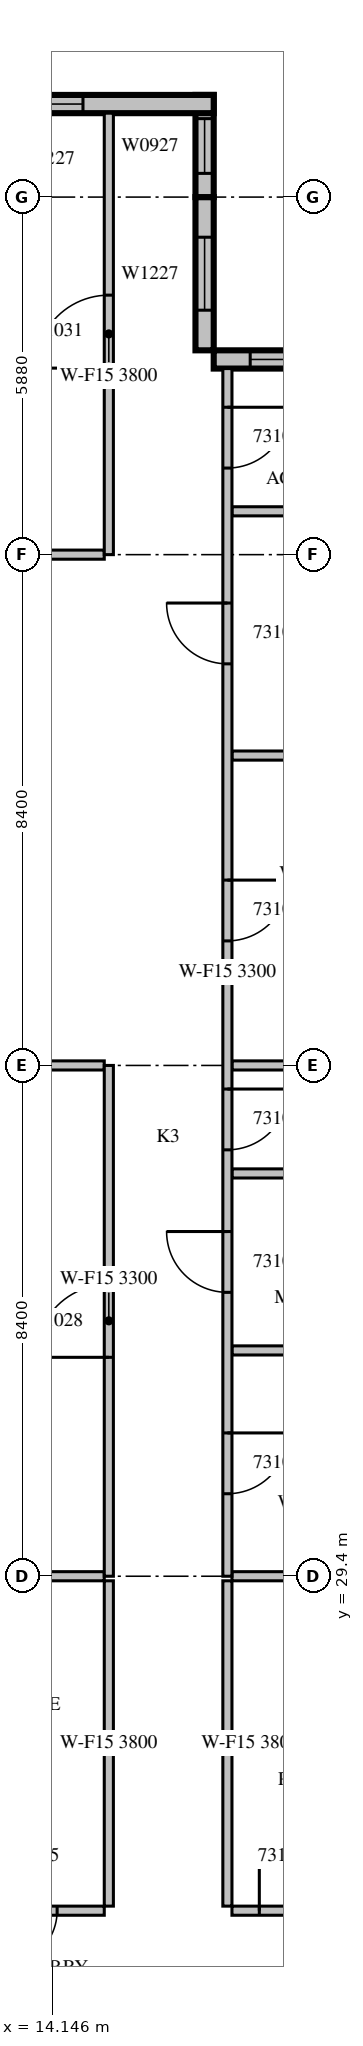
"""IFC4 building model, lengths in metres.
Left out: names, types, materials, properties, quantities, classifications, styles, units other than length and angle.
Written with IfcOpenShell. Run it as: python <this file> out.ifc"""

import sys

from ifc_helpers import new_model, si_unit, direction, frame, frame_2d, origin, place, context, subcontext, project, spatial, rectangle, extrude, source, transform, mapped, element, fill, save


model = new_model("IFC4")
c1 = context("Model", 3, precision=1e-05, world=origin(), true_north=direction((0.0, 1.0)))
c2 = subcontext(c1, "Body", "Model", "MODEL_VIEW")
j1 = project(units=[si_unit("LENGTHUNIT", "METRE"), si_unit("PLANEANGLEUNIT", "RADIAN")], contexts=[c1])
p1 = place(None, origin())
s1 = spatial("IfcSite", under=j1, at=p1, CompositionType="ELEMENT")
p2 = place(p1, origin())
s2 = spatial("IfcBuilding", under=s1, at=p2, CompositionType="ELEMENT")
p3 = place(p2, frame((0.0, 0.0, 141.3)))
s3 = spatial("IfcBuildingStorey", under=s2, at=p3, CompositionType="ELEMENT", Elevation=141.3)
m1 = source(origin(), c2, "Body", "SweptSolid", [
    extrude(rectangle(XDim=4.2, YDim=0.3, at=frame_2d((2.1, 0.0))), origin(), (0.0, 0.0, 1.0), 3.8),
])
p4 = place(p3, frame((21.0, 49.41, 0.0), z_axis=(0.0, 0.0, 1.0), x_axis=(-1.0, 0.0, 0.0)))
e1 = element("IfcWall", 1, at=p4, inside=s3, PredefinedType="STANDARD", context=c2, shape_type="MappedRepresentation", body=[
    mapped(m1, transform((0.0, 0.0, 0.0), scale=1.0)),
])
m2 = source(origin(), c2, "Body", "SweptSolid", [
    extrude(rectangle(XDim=3.0, YDim=2.7, at=frame_2d((1.5, 1.35))), frame((0.0, 0.16, 0.0), z_axis=(0.0, -1.0, 0.0), x_axis=(1.0, 0.0, 0.0)), (0.0, 0.0, 1.0), 0.32),
])
p5 = place(p4, frame((0.6, 0.0, 0.6)))
e2 = element("IfcOpeningElement", 2, at=p5, cuts=e1, PredefinedType="OPENING", context=c2, shape_type="MappedRepresentation", body=[
    mapped(m2, transform((0.0, 0.0, 0.0), scale=1.0)),
])
m3 = source(origin(), c2, "Body", "SweptSolid", [
    extrude(rectangle(XDim=2.52, YDim=0.3, at=frame_2d((1.26, 0.0))), origin(), (0.0, 0.0, 1.0), 3.8),
])
p6 = place(p3, frame((16.65, 49.56, 0.0), z_axis=(0.0, 0.0, 1.0), x_axis=(0.0, 1.0, 0.0)))
e3 = element("IfcWall", 3, at=p6, inside=s3, PredefinedType="STANDARD", context=c2, shape_type="MappedRepresentation", body=[
    mapped(m3, transform((0.0, 0.0, 0.0), scale=1.0)),
])
m4 = source(origin(), c2, "Body", "SweptSolid", [
    extrude(rectangle(XDim=1.2, YDim=2.7, at=frame_2d((0.6, 1.35))), frame((0.0, 0.16, 0.0), z_axis=(0.0, -1.0, 0.0), x_axis=(1.0, 0.0, 0.0)), (0.0, 0.0, 1.0), 0.32),
])
p7 = place(p6, frame((0.66, 0.0, 0.6)))
e4 = element("IfcOpeningElement", 4, at=p7, cuts=e3, PredefinedType="OPENING", context=c2, shape_type="MappedRepresentation", body=[
    mapped(m4, transform((0.0, 0.0, 0.0), scale=1.0)),
])
m5 = source(origin(), c2, "Body", "SweptSolid", [
    extrude(rectangle(XDim=1.68, YDim=0.3, at=frame_2d((0.84, 0.0))), origin(), (0.0, 0.0, 1.0), 3.8),
])
p8 = place(p3, frame((16.65, 52.08, 0.0), z_axis=(0.0, 0.0, 1.0), x_axis=(0.0, 1.0, 0.0)))
e5 = element("IfcWall", 5, at=p8, inside=s3, PredefinedType="STANDARD", context=c2, shape_type="MappedRepresentation", body=[
    mapped(m5, transform((0.0, 0.0, 0.0), scale=1.0)),
])
m6 = source(origin(), c2, "Body", "SweptSolid", [
    extrude(rectangle(XDim=0.9, YDim=2.7, at=frame_2d((0.45, 1.35))), frame((0.0, 0.16, 0.0), z_axis=(0.0, -1.0, 0.0), x_axis=(1.0, 0.0, 0.0)), (0.0, 0.0, 1.0), 0.32),
])
p9 = place(p8, frame((0.39, 0.0, 0.6)))
e6 = element("IfcOpeningElement", 6, at=p9, cuts=e5, PredefinedType="OPENING", context=c2, shape_type="MappedRepresentation", body=[
    mapped(m6, transform((0.0, 0.0, 0.0), scale=1.0)),
])
m7 = source(origin(), c2, "Body", "SweptSolid", [
    extrude(rectangle(XDim=10.5, YDim=0.3, at=frame_2d((5.25, 0.0))), origin(), (0.0, 0.0, 1.0), 3.8),
])
p10 = place(p3, frame((16.8, 53.61, 0.0), z_axis=(0.0, 0.0, 1.0), x_axis=(-1.0, 0.0, 0.0)))
e7 = element("IfcWall", 7, at=p10, inside=s3, PredefinedType="STANDARD", context=c2, shape_type="MappedRepresentation", body=[
    mapped(m7, transform((0.0, 0.0, 0.0), scale=1.0)),
])
p11 = place(p10, frame((2.15, 0.0, 0.6)))
e8 = element("IfcOpeningElement", 8, at=p11, cuts=e7, PredefinedType="OPENING", context=c2, shape_type="MappedRepresentation", body=[
    mapped(m4, transform((0.0, 0.0, 0.0), scale=1.0)),
])
m8 = source(origin(), c2, "Body", "SweptSolid", [
    extrude(rectangle(XDim=1.8, YDim=2.7, at=frame_2d((0.9, 1.35))), frame((0.0, 0.16, 0.0), z_axis=(0.0, -1.0, 0.0), x_axis=(1.0, 0.0, 0.0)), (0.0, 0.0, 1.0), 0.32),
])
p12 = place(p10, frame((8.025, 0.0, 0.6)))
e9 = element("IfcOpeningElement", 9, at=p12, cuts=e7, PredefinedType="OPENING", context=c2, shape_type="MappedRepresentation", body=[
    mapped(m8, transform((0.0, 0.0, 0.0), scale=1.0)),
])
m9 = source(origin(), c2, "Body", "SweptSolid", [
    extrude(rectangle(XDim=8.495, YDim=0.15, at=frame_2d((4.247, 0.0))), origin(), (0.0, 0.0, 1.0), 3.8),
])
p13 = place(p3, frame((6.505, 23.9, 0.0), z_axis=(0.0, 0.0, 1.0), x_axis=(1.0, 0.0, 0.0)))
e10 = element("IfcWall", 10, at=p13, inside=s3, PredefinedType="PARTITIONING", context=c2, shape_type="MappedRepresentation", body=[
    mapped(m9, transform((0.0, 0.0, 0.0), scale=1.0)),
])
m10 = source(origin(), c2, "Body", "SweptSolid", [
    extrude(rectangle(XDim=0.9, YDim=2.1, at=frame_2d((0.45, 1.05))), frame((0.0, 0.085, 0.0), z_axis=(0.0, -1.0, 0.0), x_axis=(1.0, 0.0, 0.0)), (0.0, 0.0, 1.0), 0.17),
])
p14 = place(p13, frame((1.745, 0.0, 0.0)))
e11 = element("IfcOpeningElement", 11, at=p14, cuts=e10, PredefinedType="OPENING", context=c2, shape_type="MappedRepresentation", body=[
    mapped(m10, transform((0.0, 0.0, 0.0), scale=1.0)),
])
p15 = place(p13, frame((6.82, 0.0, 0.0)))
e12 = element("IfcOpeningElement", 12, at=p15, cuts=e10, PredefinedType="OPENING", context=c2, shape_type="MappedRepresentation", body=[
    mapped(m10, transform((0.0, 0.0, 0.0), scale=1.0)),
])
m11 = source(origin(), c2, "Body", "SweptSolid", [
    extrude(rectangle(XDim=3.6, YDim=0.15, at=frame_2d((1.8, 0.0))), origin(), (0.0, 0.0, 1.0), 3.8),
])
p16 = place(p3, frame((17.1, 23.9, 0.0), z_axis=(0.0, 0.0, 1.0), x_axis=(1.0, 0.0, 0.0)))
e13 = element("IfcWall", 13, at=p16, inside=s3, PredefinedType="PARTITIONING", context=c2, shape_type="MappedRepresentation", body=[
    mapped(m11, transform((0.0, 0.0, 0.0), scale=1.0)),
])
p17 = place(p16, frame((0.45, 0.0, 0.0)))
e14 = element("IfcOpeningElement", 14, at=p17, cuts=e13, PredefinedType="OPENING", context=c2, shape_type="MappedRepresentation", body=[
    mapped(m10, transform((0.0, 0.0, 0.0), scale=1.0)),
])
m12 = source(origin(), c2, "Body", "SweptSolid", [
    extrude(rectangle(XDim=5.35, YDim=0.15, at=frame_2d((2.675, 0.0))), origin(), (0.0, 0.0, 1.0), 3.8),
])
for number, where, z_axis, x_axis in (
    (15, (15.075, 23.975, 0.0), (0.0, 0.0, 1.0), (0.0, 1.0, 0.0)),
    (16, (17.025, 29.325, 0.0), (0.0, 0.0, 1.0), (0.0, -1.0, 0.0)),
):
    element("IfcWall", number, at=place(p3, frame(where, z_axis=z_axis, x_axis=x_axis)), inside=s3, PredefinedType="PARTITIONING", context=c2, shape_type="MappedRepresentation", body=[
        mapped(m12, transform((0.0, 0.0, 0.0), scale=1.0)),
    ])
m13 = source(origin(), c2, "Body", "SweptSolid", [
    extrude(rectangle(XDim=3.976, YDim=0.15, at=frame_2d((1.988, 0.0))), origin(), (0.0, 0.0, 1.0), 3.8),
])
p18 = place(p3, frame((15.0, 29.4, 0.0), z_axis=(0.0, 0.0, 1.0), x_axis=(-1.0, 0.0, 0.0)))
e17 = element("IfcWall", 17, at=p18, inside=s3, PredefinedType="PARTITIONING", context=c2, shape_type="MappedRepresentation", body=[
    mapped(m13, transform((0.0, 0.0, 0.0), scale=1.0)),
])
m14 = source(origin(), c2, "Body", "SweptSolid", [
    extrude(rectangle(XDim=2.851, YDim=0.15, at=frame_2d((1.425, 0.0))), origin(), (0.0, 0.0, 1.0), 3.8),
])
p19 = place(p3, frame((19.951, 29.4, 0.0), z_axis=(0.0, 0.0, 1.0), x_axis=(-1.0, 0.0, 0.0)))
e18 = element("IfcWall", 18, at=p19, inside=s3, PredefinedType="PARTITIONING", context=c2, shape_type="MappedRepresentation", body=[
    mapped(m14, transform((0.0, 0.0, 0.0), scale=1.0)),
])
m15 = source(origin(), c2, "Body", "SweptSolid", [
    extrude(rectangle(XDim=3.825, YDim=0.15, at=frame_2d((1.913, 0.0))), origin(), (0.0, 0.0, 1.0), 3.8),
])
for number, where, z_axis, x_axis in (
    (19, (15.0, 37.8, 0.0), (0.0, 0.0, 1.0), (-1.0, 0.0, 0.0)),
    (20, (15.0, 46.2, 0.0), (0.0, 0.0, 1.0), (-1.0, 0.0, 0.0)),
):
    element("IfcWall", number, at=place(p3, frame(where, z_axis=z_axis, x_axis=x_axis)), inside=s3, PredefinedType="PARTITIONING", context=c2, shape_type="MappedRepresentation", body=[
        mapped(m15, transform((0.0, 0.0, 0.0), scale=1.0)),
    ])
m16 = source(origin(), c2, "Body", "SweptSolid", [
    extrude(rectangle(XDim=3.6, YDim=0.15, at=frame_2d((1.8, 0.0))), origin(), (0.0, 0.0, 1.0), 2.8),
])
for number, where, z_axis, x_axis in (
    (21, (17.1, 33.113, 0.0), (0.0, 0.0, 1.0), (1.0, 0.0, 0.0)),
    (22, (17.1, 36.024, 0.0), (0.0, 0.0, 1.0), (1.0, 0.0, 0.0)),
):
    element("IfcWall", number, at=place(p3, frame(where, z_axis=z_axis, x_axis=x_axis)), inside=s3, PredefinedType="PARTITIONING", context=c2, shape_type="MappedRepresentation", body=[
        mapped(m16, transform((0.0, 0.0, 0.0), scale=1.0)),
    ])
for number, where, z_axis, x_axis in (
    (23, (17.1, 42.896, 0.0), (0.0, 0.0, 1.0), (1.0, 0.0, 0.0)),
    (24, (17.1, 46.913, 0.0), (0.0, 0.0, 1.0), (1.0, 0.0, 0.0)),
):
    element("IfcWall", number, at=place(p3, frame(where, z_axis=z_axis, x_axis=x_axis)), inside=s3, PredefinedType="PARTITIONING", context=c2, shape_type="MappedRepresentation", body=[
        mapped(m11, transform((0.0, 0.0, 0.0), scale=1.0)),
    ])
p20 = place(p3, frame((19.951, 37.8, 0.0), z_axis=(0.0, 0.0, 1.0), x_axis=(-1.0, 0.0, 0.0)))
e25 = element("IfcWall", 25, at=p20, inside=s3, PredefinedType="PARTITIONING", context=c2, shape_type="MappedRepresentation", body=[
    mapped(m14, transform((0.0, 0.0, 0.0), scale=1.0)),
])
m17 = source(origin(), c2, "Body", "SweptSolid", [
    extrude(rectangle(XDim=8.4, YDim=0.15, at=frame_2d((4.2, 0.0))), origin(), (0.0, 0.0, 1.0), 3.3),
])
p21 = place(p3, frame((15.075, 29.4, 0.0), z_axis=(0.0, 0.0, 1.0), x_axis=(0.0, 1.0, 0.0)))
e26 = element("IfcWall", 26, at=p21, inside=s3, PredefinedType="PARTITIONING", context=c2, shape_type="MappedRepresentation", body=[
    mapped(m17, transform((0.0, 0.0, 0.0), scale=1.0)),
])
m18 = source(origin(), c2, "Body", "SweptSolid", [
    extrude(rectangle(XDim=1.2, YDim=2.1, at=frame_2d((0.6, 1.05))), frame((0.0, 0.085, 0.0), z_axis=(0.0, -1.0, 0.0), x_axis=(1.0, 0.0, 0.0)), (0.0, 0.0, 1.0), 0.17),
])
p22 = place(p21, frame((3.6, 0.0, 0.0)))
e27 = element("IfcOpeningElement", 27, at=p22, cuts=e26, PredefinedType="OPENING", context=c2, shape_type="MappedRepresentation", body=[
    mapped(m18, transform((0.0, 0.0, 0.0), scale=1.0)),
])
m19 = source(origin(), c2, "Body", "SweptSolid", [
    extrude(rectangle(XDim=7.26, YDim=0.15, at=frame_2d((3.63, 0.0))), origin(), (0.0, 0.0, 1.0), 3.8),
])
p23 = place(p3, frame((15.075, 46.2, 0.0), z_axis=(0.0, 0.0, 1.0), x_axis=(0.0, 1.0, 0.0)))
e28 = element("IfcWall", 28, at=p23, inside=s3, PredefinedType="PARTITIONING", context=c2, shape_type="MappedRepresentation", body=[
    mapped(m19, transform((0.0, 0.0, 0.0), scale=1.0)),
])
p24 = place(p23, frame((3.067, 0.0, 0.0)))
e29 = element("IfcOpeningElement", 29, at=p24, cuts=e28, PredefinedType="OPENING", context=c2, shape_type="MappedRepresentation", body=[
    mapped(m18, transform((0.0, 0.0, 0.0), scale=1.0)),
])
m20 = source(origin(), c2, "Body", "SweptSolid", [
    extrude(rectangle(XDim=19.86, YDim=0.15, at=frame_2d((9.93, 0.0))), origin(), (0.0, 0.0, 1.0), 3.3),
])
p25 = place(p3, frame((17.025, 49.26, 0.0), z_axis=(0.0, 0.0, 1.0), x_axis=(0.0, -1.0, 0.0)))
e30 = element("IfcWall", 30, at=p25, inside=s3, PredefinedType="PARTITIONING", context=c2, shape_type="MappedRepresentation", body=[
    mapped(m20, transform((0.0, 0.0, 0.0), scale=1.0)),
])
m21 = source(origin(), c2, "Body", "SweptSolid", [
    extrude(rectangle(XDim=1.0, YDim=2.1, at=frame_2d((0.5, 1.05))), frame((0.0, 0.085, 0.0), z_axis=(0.0, -1.0, 0.0), x_axis=(1.0, 0.0, 0.0)), (0.0, 0.0, 1.0), 0.17),
])
p26 = place(p25, frame((17.503, 0.0, 0.0)))
e31 = element("IfcOpeningElement", 31, at=p26, cuts=e30, PredefinedType="OPENING", context=c2, shape_type="MappedRepresentation", body=[
    mapped(m21, transform((0.0, 0.0, 0.0), scale=1.0)),
])
p27 = place(p25, frame((14.191, 0.0, 0.0)))
e32 = element("IfcOpeningElement", 32, at=p27, cuts=e30, PredefinedType="OPENING", context=c2, shape_type="MappedRepresentation", body=[
    mapped(m21, transform((0.0, 0.0, 0.0), scale=1.0)),
])
p28 = place(p25, frame((11.848, 0.0, 0.0)))
e33 = element("IfcOpeningElement", 33, at=p28, cuts=e30, PredefinedType="OPENING", context=c2, shape_type="MappedRepresentation", body=[
    mapped(m21, transform((0.0, 0.0, 0.0), scale=1.0)),
])
p29 = place(p25, frame((8.412, 0.0, 0.0)))
e34 = element("IfcOpeningElement", 34, at=p29, cuts=e30, PredefinedType="OPENING", context=c2, shape_type="MappedRepresentation", body=[
    mapped(m21, transform((0.0, 0.0, 0.0), scale=1.0)),
])
p30 = place(p25, frame((3.856, 0.0, 0.0)))
e35 = element("IfcOpeningElement", 35, at=p30, cuts=e30, PredefinedType="OPENING", context=c2, shape_type="MappedRepresentation", body=[
    mapped(m21, transform((0.0, 0.0, 0.0), scale=1.0)),
])
p31 = place(p25, frame((0.636, 0.0, 0.0)))
e36 = element("IfcOpeningElement", 36, at=p31, cuts=e30, PredefinedType="OPENING", context=c2, shape_type="MappedRepresentation", body=[
    mapped(m21, transform((0.0, 0.0, 0.0), scale=1.0)),
])
m22 = source(origin(), c2, "Body", "SweptSolid", [
    extrude(rectangle(XDim=3.0, YDim=2.7, at=frame_2d((1.5, 1.35))), frame((0.0, 0.03, 0.0), z_axis=(0.0, -1.0, 0.0), x_axis=(1.0, 0.0, 0.0)), (0.0, 0.0, 1.0), 0.06),
])
p32 = place(p5, origin())
e37 = element("IfcWindow", 37, at=p32, inside=s3, PartitioningType="SINGLE_PANEL", PredefinedType="WINDOW", context=c2, shape_type="MappedRepresentation", body=[
    mapped(m22, transform((0.0, 0.0, 0.0), scale=1.0)),
])
fill(e2, e37)
m23 = source(origin(), c2, "Body", "SweptSolid", [
    extrude(rectangle(XDim=1.2, YDim=2.7, at=frame_2d((0.6, 1.35))), frame((0.0, 0.03, 0.0), z_axis=(0.0, -1.0, 0.0), x_axis=(1.0, 0.0, 0.0)), (0.0, 0.0, 1.0), 0.06),
])
p33 = place(p7, origin())
e38 = element("IfcWindow", 38, at=p33, inside=s3, PartitioningType="SINGLE_PANEL", PredefinedType="WINDOW", context=c2, shape_type="MappedRepresentation", body=[
    mapped(m23, transform((0.0, 0.0, 0.0), scale=1.0)),
])
fill(e4, e38)
m24 = source(origin(), c2, "Body", "SweptSolid", [
    extrude(rectangle(XDim=0.9, YDim=2.7, at=frame_2d((0.45, 1.35))), frame((0.0, 0.03, 0.0), z_axis=(0.0, -1.0, 0.0), x_axis=(1.0, 0.0, 0.0)), (0.0, 0.0, 1.0), 0.06),
])
p34 = place(p9, origin())
e39 = element("IfcWindow", 39, at=p34, inside=s3, PartitioningType="SINGLE_PANEL", PredefinedType="WINDOW", context=c2, shape_type="MappedRepresentation", body=[
    mapped(m24, transform((0.0, 0.0, 0.0), scale=1.0)),
])
fill(e6, e39)
p35 = place(p11, origin())
e40 = element("IfcWindow", 40, at=p35, inside=s3, PartitioningType="SINGLE_PANEL", PredefinedType="WINDOW", context=c2, shape_type="MappedRepresentation", body=[
    mapped(m23, transform((0.0, 0.0, 0.0), scale=1.0)),
])
fill(e8, e40)
m25 = source(origin(), c2, "Body", "SweptSolid", [
    extrude(rectangle(XDim=0.9, YDim=2.1, at=frame_2d((0.45, 1.05))), frame((0.0, 0.025, 0.0), z_axis=(0.0, -1.0, 0.0), x_axis=(1.0, 0.0, 0.0)), (0.0, 0.0, 1.0), 0.05),
])
p36 = place(p15, origin())
e41 = element("IfcDoor", 41, at=p36, inside=s3, OperationType="SINGLE_SWING_RIGHT", PredefinedType="DOOR", context=c2, shape_type="MappedRepresentation", body=[
    mapped(m25, transform((0.0, 0.0, 0.0), scale=1.0)),
])
fill(e12, e41)
p37 = place(p17, origin())
e42 = element("IfcDoor", 42, at=p37, inside=s3, OperationType="SINGLE_SWING_LEFT", PredefinedType="DOOR", context=c2, shape_type="MappedRepresentation", body=[
    mapped(m25, transform((0.0, 0.0, 0.0), scale=1.0)),
])
fill(e14, e42)
m26 = source(origin(), c2, "Body", "SweptSolid", [
    extrude(rectangle(XDim=1.2, YDim=2.1, at=frame_2d((0.6, 1.05))), frame((0.0, 0.025, 0.0), z_axis=(0.0, -1.0, 0.0), x_axis=(1.0, 0.0, 0.0)), (0.0, 0.0, 1.0), 0.05),
])
p38 = place(p22, origin())
e43 = element("IfcDoor", 43, at=p38, inside=s3, OperationType="SINGLE_SWING_LEFT", PredefinedType="DOOR", context=c2, shape_type="MappedRepresentation", body=[
    mapped(m26, transform((0.0, 0.0, 0.0), scale=1.0)),
])
fill(e27, e43)
p39 = place(p24, origin())
e44 = element("IfcDoor", 44, at=p39, inside=s3, OperationType="SINGLE_SWING_LEFT", PredefinedType="DOOR", context=c2, shape_type="MappedRepresentation", body=[
    mapped(m26, transform((0.0, 0.0, 0.0), scale=1.0)),
])
fill(e29, e44)
m27 = source(origin(), c2, "Body", "SweptSolid", [
    extrude(rectangle(XDim=1.0, YDim=2.1, at=frame_2d((0.5, 1.05))), frame((0.0, 0.025, 0.0), z_axis=(0.0, -1.0, 0.0), x_axis=(1.0, 0.0, 0.0)), (0.0, 0.0, 1.0), 0.05),
])
p40 = place(p26, origin())
e45 = element("IfcDoor", 45, at=p40, inside=s3, OperationType="SINGLE_SWING_LEFT", PredefinedType="DOOR", context=c2, shape_type="MappedRepresentation", body=[
    mapped(m27, transform((0.0, 0.0, 0.0), scale=1.0)),
])
fill(e31, e45)
p41 = place(p27, origin())
e46 = element("IfcDoor", 46, at=p41, inside=s3, OperationType="SINGLE_SWING_RIGHT", PredefinedType="DOOR", context=c2, shape_type="MappedRepresentation", body=[
    mapped(m27, transform((0.0, 0.0, 0.0), scale=1.0)),
])
fill(e32, e46)
p42 = place(p28, origin())
e47 = element("IfcDoor", 47, at=p42, inside=s3, OperationType="SINGLE_SWING_LEFT", PredefinedType="DOOR", context=c2, shape_type="MappedRepresentation", body=[
    mapped(m27, transform((0.0, 0.0, 0.0), scale=1.0)),
])
fill(e33, e47)
p43 = place(p29, origin())
e48 = element("IfcDoor", 48, at=p43, inside=s3, OperationType="SINGLE_SWING_LEFT", PredefinedType="DOOR", context=c2, shape_type="MappedRepresentation", body=[
    mapped(m27, transform((0.0, 0.0, 0.0), scale=1.0)),
])
fill(e34, e48)
p44 = place(p30, origin())
e49 = element("IfcDoor", 49, at=p44, inside=s3, OperationType="SINGLE_SWING_RIGHT", PredefinedType="DOOR", context=c2, shape_type="MappedRepresentation", body=[
    mapped(m27, transform((0.0, 0.0, 0.0), scale=1.0)),
])
fill(e35, e49)
p45 = place(p31, origin())
e50 = element("IfcDoor", 50, at=p45, inside=s3, OperationType="SINGLE_SWING_LEFT", PredefinedType="DOOR", context=c2, shape_type="MappedRepresentation", body=[
    mapped(m27, transform((0.0, 0.0, 0.0), scale=1.0)),
])
fill(e36, e50)
save(model, sys.argv[1])
